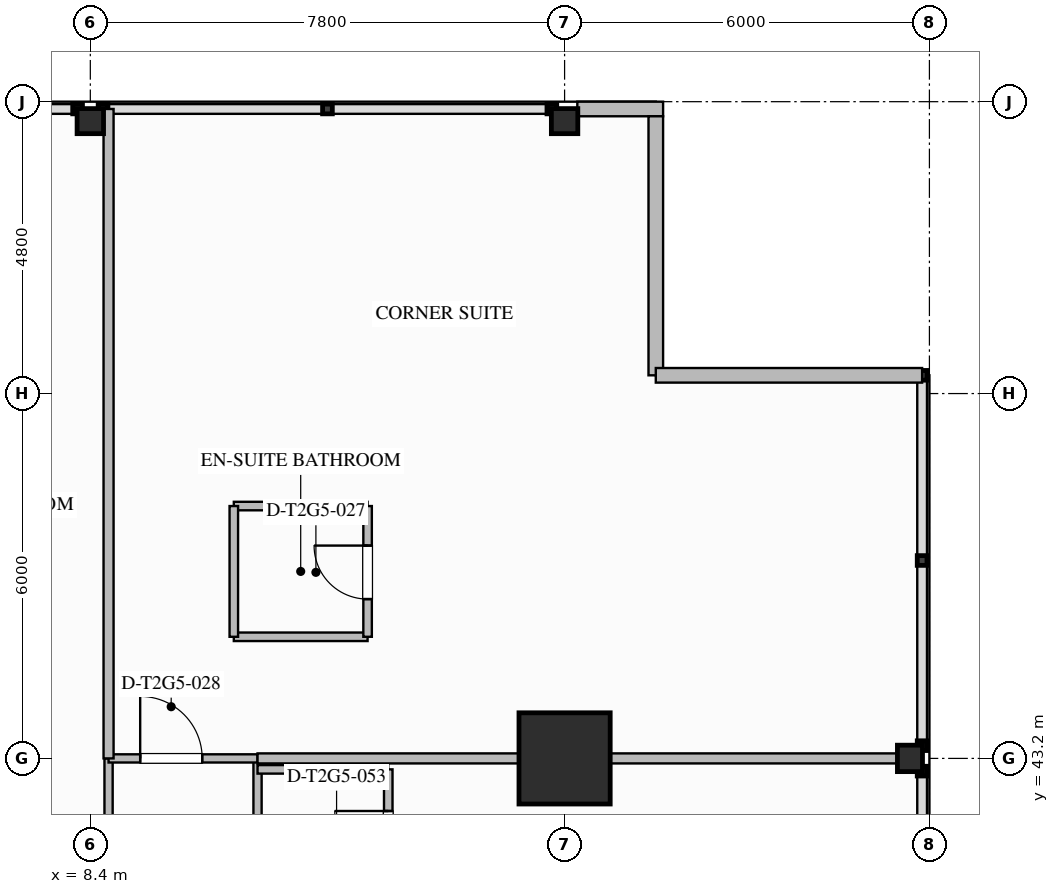
"""IFC4 building model, lengths in metres.
Left out: names, types, materials, properties, quantities, classifications, styles, units other than length and angle.
Written with IfcOpenShell. Run it as: python <this file> out.ifc"""

import sys

from ifc_helpers import new_model, si_unit, direction, frame, frame_2d, origin, origin_2d, place, context, subcontext, project, spatial, rectangle, i_section, extrude, element, fill, save


model = new_model("IFC4")
c1 = context("Model", 3, precision=1e-05, world=origin(), true_north=direction((0.0, 1.0)))
c2 = subcontext(c1, "Body", "Model", "MODEL_VIEW")
j1 = project(units=[si_unit("LENGTHUNIT", "METRE"), si_unit("PLANEANGLEUNIT", "RADIAN")], contexts=[c1])
p1 = place(None, origin())
s1 = spatial("IfcSite", under=j1, at=p1, CompositionType="ELEMENT")
p2 = place(p1, origin())
s2 = spatial("IfcBuilding", under=s1, at=p2, CompositionType="ELEMENT")
p3 = place(p2, frame((0.0, 0.0, 133.8)))
s3 = spatial("IfcBuildingStorey", under=s2, at=p3, CompositionType="ELEMENT", Elevation=133.8)
p4 = place(p3, frame((16.2, 43.2, 0.0), z_axis=(0.0, 0.0, 1.0), x_axis=(1.0, 0.0, 0.0)))
e1 = element("IfcColumn", 1, at=p4, inside=s3, PredefinedType="COLUMN", context=c2, shape_type="SweptSolid", body=[
    extrude(rectangle(XDim=1.5, YDim=1.5, at=origin_2d()), origin(), (0.0, 0.0, 1.0), 3.5),
])
for number, where, z_axis, x_axis in (
    (2, (21.88, 43.2, 0.0), (0.0, 0.0, 1.0), (1.0, 0.0, 0.0)),
    (3, (8.4, 53.68, 0.0), (0.0, 0.0, 1.0), (0.0, 1.0, 0.0)),
    (4, (16.2, 53.68, 0.0), (0.0, 0.0, 1.0), (0.0, 1.0, 0.0)),
):
    element("IfcColumn", number, at=place(p3, frame(where, z_axis=z_axis, x_axis=x_axis)), inside=s3, PredefinedType="COLUMN", context=c2, shape_type="SweptSolid", body=[
        extrude(i_section(OverallWidth=0.412, OverallDepth=0.435, WebThickness=0.036, FlangeThickness=0.057, FilletRadius=0.028, at=origin_2d()), origin(), (0.0, 0.0, 1.0), 3.497),
    ])
p5 = place(p3, frame((16.409, 53.88, 0.0), z_axis=(0.0, 0.0, 1.0), x_axis=(1.0, 0.0, 0.0)))
e5 = element("IfcWall", 5, at=p5, inside=s3, PredefinedType="STANDARD", context=c2, shape_type="SweptSolid", body=[
    extrude(rectangle(XDim=1.411, YDim=0.24, at=frame_2d((0.705, 0.0))), origin(), (0.0, 0.0, 1.0), 3.24),
])
p6 = place(p3, frame((17.7, 53.76, 0.0), z_axis=(0.0, 0.0, 1.0), x_axis=(0.0, -1.0, 0.0)))
e6 = element("IfcWall", 6, at=p6, inside=s3, PredefinedType="STANDARD", context=c2, shape_type="SweptSolid", body=[
    extrude(rectangle(XDim=4.26, YDim=0.24, at=frame_2d((2.13, 0.0))), origin(), (0.0, 0.0, 1.0), 3.24),
])
p7 = place(p3, frame((17.7, 49.5, 0.0), z_axis=(0.0, 0.0, 1.0), x_axis=(1.0, 0.0, 0.0)))
e7 = element("IfcWall", 7, at=p7, inside=s3, PredefinedType="STANDARD", context=c2, shape_type="SweptSolid", body=[
    extrude(rectangle(XDim=4.38, YDim=0.24, at=frame_2d((2.19, 0.0))), origin(), (0.0, 0.0, 1.0), 3.24),
])
p8 = place(p3, frame((8.7, 38.75, 0.0), z_axis=(0.0, 0.0, 1.0), x_axis=(0.0, 1.0, 0.0)))
e8 = element("IfcWall", 8, at=p8, inside=s3, PredefinedType="PARTITIONING", context=c2, shape_type="SweptSolid", body=[
    extrude(rectangle(XDim=4.45, YDim=0.135, at=frame_2d((2.225, 0.0))), origin(), (0.0, 0.0, 1.0), 3.24),
])
p9 = place(p3, frame((11.15, 10.8, 0.0), z_axis=(0.0, 0.0, 1.0), x_axis=(0.0, 1.0, 0.0)))
e9 = element("IfcWall", 9, at=p9, inside=s3, PredefinedType="PARTITIONING", context=c2, shape_type="SweptSolid", body=[
    extrude(rectangle(XDim=32.4, YDim=0.135, at=frame_2d((16.2, 0.0))), origin(), (0.0, 0.0, 1.0), 3.24),
])
p10 = place(p9, frame((3.806, 0.0, 0.0)))
e10 = element("IfcOpeningElement", 10, at=p10, cuts=e9, PredefinedType="OPENING", context=c2, shape_type="SweptSolid", body=[
    extrude(rectangle(XDim=1.26, YDim=2.2, at=frame_2d((0.63, 1.1))), frame((0.0, 0.077, 0.0), z_axis=(0.0, -1.0, 0.0), x_axis=(1.0, 0.0, 0.0)), (0.0, 0.0, 1.0), 0.155),
])
p11 = place(p9, frame((15.57, 0.0, 0.0)))
e11 = element("IfcOpeningElement", 11, at=p11, cuts=e9, PredefinedType="OPENING", context=c2, shape_type="SweptSolid", body=[
    extrude(rectangle(XDim=1.26, YDim=2.2, at=frame_2d((0.63, 1.1))), frame((0.0, 0.077, 0.0), z_axis=(0.0, -1.0, 0.0), x_axis=(1.0, 0.0, 0.0)), (0.0, 0.0, 1.0), 0.155),
])
p12 = place(p9, frame((24.904, 0.0, 0.0)))
e12 = element("IfcOpeningElement", 12, at=p12, cuts=e9, PredefinedType="OPENING", context=c2, shape_type="SweptSolid", body=[
    extrude(rectangle(XDim=1.26, YDim=2.2, at=frame_2d((0.63, 1.1))), frame((0.0, 0.077, 0.0), z_axis=(0.0, -1.0, 0.0), x_axis=(1.0, 0.0, 0.0)), (0.0, 0.0, 1.0), 0.155),
])
p13 = place(p3, frame((8.7, 43.2, 0.0), z_axis=(0.0, 0.0, 1.0), x_axis=(1.0, 0.0, 0.0)))
e13 = element("IfcWall", 13, at=p13, inside=s3, PredefinedType="PARTITIONING", context=c2, shape_type="SweptSolid", body=[
    extrude(rectangle(XDim=2.45, YDim=0.135, at=frame_2d((1.225, 0.0))), origin(), (0.0, 0.0, 1.0), 2.53),
])
p14 = place(p13, frame((0.52, 0.0, 0.0)))
e14 = element("IfcOpeningElement", 14, at=p14, cuts=e13, PredefinedType="OPENING", context=c2, shape_type="SweptSolid", body=[
    extrude(rectangle(XDim=1.02, YDim=2.15, at=frame_2d((0.51, 1.075))), frame((0.0, 0.077, 0.0), z_axis=(0.0, -1.0, 0.0), x_axis=(1.0, 0.0, 0.0)), (0.0, 0.0, 1.0), 0.155),
])
p15 = place(p3, frame((8.7, 43.2, 0.0), z_axis=(0.0, 0.0, 1.0), x_axis=(0.0, 1.0, 0.0)))
e15 = element("IfcWall", 15, at=p15, inside=s3, PredefinedType="PARTITIONING", context=c2, shape_type="SweptSolid", body=[
    extrude(rectangle(XDim=10.68, YDim=0.165, at=frame_2d((5.34, 0.0))), origin(), (0.0, 0.0, 1.0), 2.53),
])
p16 = place(p3, frame((11.15, 43.2, 0.0), z_axis=(0.0, 0.0, 1.0), x_axis=(1.0, 0.0, 0.0)))
e16 = element("IfcWall", 16, at=p16, inside=s3, PredefinedType="PARTITIONING", context=c2, shape_type="SweptSolid", body=[
    extrude(rectangle(XDim=10.93, YDim=0.165, at=frame_2d((5.465, 0.0))), origin(), (0.0, 0.0, 1.0), 2.53),
])
for number, where, z_axis, x_axis in (
    (17, (10.76, 45.2, 0.0), (0.0, 0.0, 1.0), (1.0, 0.0, 0.0)),
    (18, (10.76, 47.35, 0.0), (0.0, 0.0, 1.0), (1.0, 0.0, 0.0)),
):
    element("IfcWall", number, at=place(p3, frame(where, z_axis=z_axis, x_axis=x_axis)), inside=s3, PredefinedType="PLUMBINGWALL", context=c2, shape_type="SweptSolid", body=[
        extrude(rectangle(XDim=2.2, YDim=0.14, at=frame_2d((1.1, 0.0))), origin(), (0.0, 0.0, 1.0), 3.24),
    ])
p17 = place(p3, frame((10.76, 45.2, 0.0), z_axis=(0.0, 0.0, 1.0), x_axis=(0.0, 1.0, 0.0)))
e19 = element("IfcWall", 19, at=p17, inside=s3, PredefinedType="PLUMBINGWALL", context=c2, shape_type="SweptSolid", body=[
    extrude(rectangle(XDim=2.15, YDim=0.14, at=frame_2d((1.075, 0.0))), origin(), (0.0, 0.0, 1.0), 3.24),
])
p18 = place(p3, frame((12.96, 45.2, 0.0), z_axis=(0.0, 0.0, 1.0), x_axis=(0.0, 1.0, 0.0)))
e20 = element("IfcWall", 20, at=p18, inside=s3, PredefinedType="PLUMBINGWALL", context=c2, shape_type="SweptSolid", body=[
    extrude(rectangle(XDim=2.15, YDim=0.14, at=frame_2d((1.075, 0.0))), origin(), (0.0, 0.0, 1.0), 3.24),
])
p19 = place(p18, frame((0.62, 0.0, 0.0)))
e21 = element("IfcOpeningElement", 21, at=p19, cuts=e20, PredefinedType="OPENING", context=c2, shape_type="SweptSolid", body=[
    extrude(rectangle(XDim=0.88, YDim=2.1, at=frame_2d((0.44, 1.05))), frame((0.0, 0.08, 0.0), z_axis=(0.0, -1.0, 0.0), x_axis=(1.0, 0.0, 0.0)), (0.0, 0.0, 1.0), 0.16),
])
p20 = place(p3, frame((11.15, 43.02, 0.0), z_axis=(0.0, 0.0, 1.0), x_axis=(1.0, 0.0, 0.0)))
e22 = element("IfcWall", 22, at=p20, inside=s3, PredefinedType="PLUMBINGWALL", context=c2, shape_type="SweptSolid", body=[
    extrude(rectangle(XDim=2.15, YDim=0.14, at=frame_2d((1.075, 0.0))), origin(), (0.0, 0.0, 1.0), 2.53),
])
p21 = place(p3, frame((13.3, 40.77, 0.0), z_axis=(0.0, 0.0, 1.0), x_axis=(0.0, 1.0, 0.0)))
e23 = element("IfcWall", 23, at=p21, inside=s3, PredefinedType="PLUMBINGWALL", context=c2, shape_type="SweptSolid", body=[
    extrude(rectangle(XDim=2.25, YDim=0.14, at=frame_2d((1.125, 0.0))), origin(), (0.0, 0.0, 1.0), 3.24),
])
p22 = place(p21, frame((0.685, 0.0, 0.0)))
e24 = element("IfcOpeningElement", 24, at=p22, cuts=e23, PredefinedType="OPENING", context=c2, shape_type="SweptSolid", body=[
    extrude(rectangle(XDim=0.88, YDim=2.1, at=frame_2d((0.44, 1.05))), frame((0.0, 0.08, 0.0), z_axis=(0.0, -1.0, 0.0), x_axis=(1.0, 0.0, 0.0)), (0.0, 0.0, 1.0), 0.16),
])
p23 = place(p19, origin())
e25 = element("IfcDoor", 25, at=p23, inside=s3, OperationType="SINGLE_SWING_RIGHT", PredefinedType="DOOR", context=c2, shape_type="SweptSolid", body=[
    extrude(rectangle(XDim=0.88, YDim=2.1, at=frame_2d((0.44, 1.05))), frame((0.0, 0.025, 0.0), z_axis=(0.0, -1.0, 0.0), x_axis=(1.0, 0.0, 0.0)), (0.0, 0.0, 1.0), 0.05),
])
fill(e21, e25)
p24 = place(p14, origin())
e26 = element("IfcDoor", 26, at=p24, inside=s3, OperationType="SINGLE_SWING_LEFT", PredefinedType="DOOR", context=c2, shape_type="SweptSolid", body=[
    extrude(rectangle(XDim=1.02, YDim=2.15, at=frame_2d((0.51, 1.075))), frame((0.0, 0.025, 0.0), z_axis=(0.0, -1.0, 0.0), x_axis=(1.0, 0.0, 0.0)), (0.0, 0.0, 1.0), 0.05),
])
fill(e14, e26)
p25 = place(p22, origin())
e27 = element("IfcDoor", 27, at=p25, inside=s3, OperationType="SINGLE_SWING_RIGHT", PredefinedType="DOOR", context=c2, shape_type="SweptSolid", body=[
    extrude(rectangle(XDim=0.88, YDim=2.1, at=frame_2d((0.44, 1.05))), frame((0.0, 0.025, 0.0), z_axis=(0.0, -1.0, 0.0), x_axis=(1.0, 0.0, 0.0)), (0.0, 0.0, 1.0), 0.05),
])
fill(e24, e27)
save(model, sys.argv[1])
